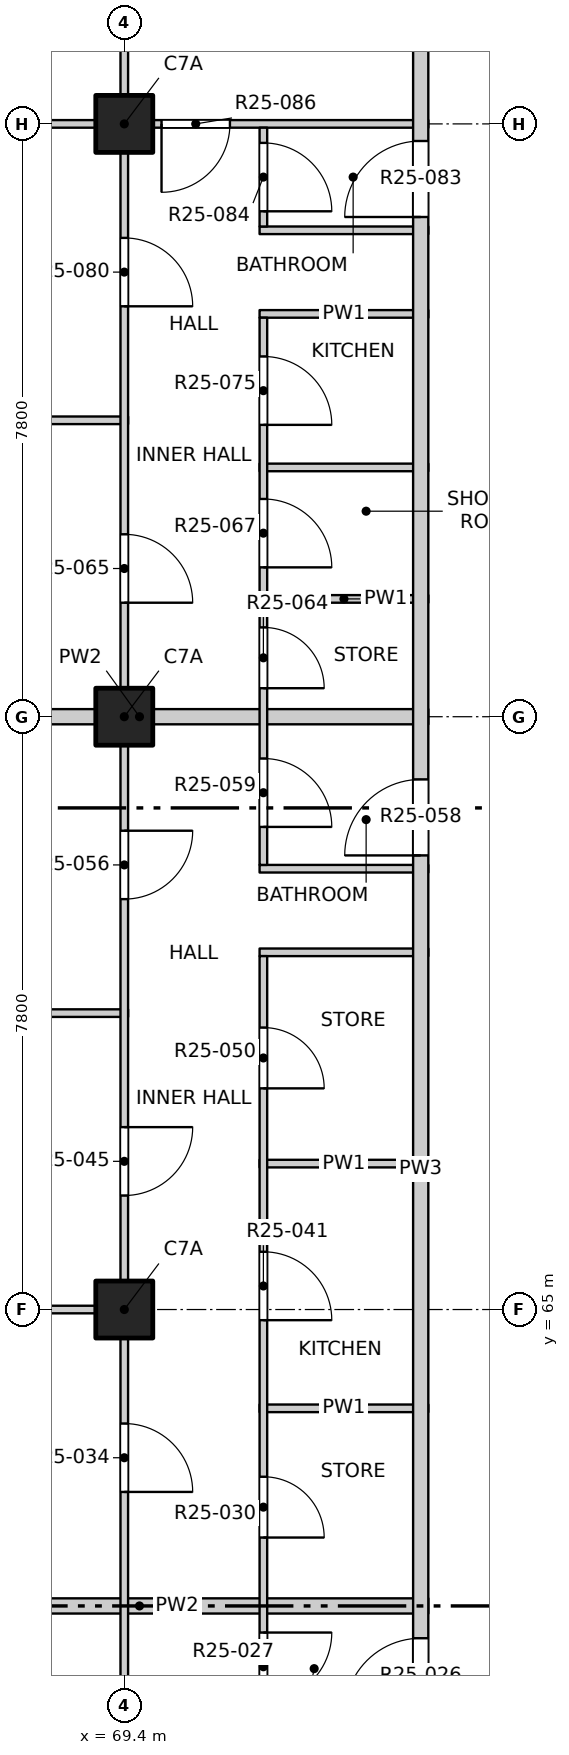
"""IFC4 building model, lengths in metres.
Left out: names, types, materials, properties, quantities, classifications, styles, units other than length and angle.
Written with IfcOpenShell. Run it as: python <this file> out.ifc"""

import sys

from ifc_helpers import new_model, si_unit, direction, frame, frame_2d, origin, origin_2d, place, context, subcontext, project, spatial, rectangle, extrude, element, fill, save


model = new_model("IFC4")
c1 = context("Model", 3, precision=1e-05, world=origin(), true_north=direction((0.0, 1.0)))
c2 = subcontext(c1, "Body", "Model", "MODEL_VIEW")
j1 = project(units=[si_unit("LENGTHUNIT", "METRE"), si_unit("PLANEANGLEUNIT", "RADIAN")], contexts=[c1])
p1 = place(None, origin())
s1 = spatial("IfcSite", under=j1, at=p1, CompositionType="ELEMENT")
p2 = place(p1, origin())
s2 = spatial("IfcBuilding", under=s1, at=p2, CompositionType="ELEMENT")
p3 = place(p2, frame((0.0, 0.0, 252.8)))
s3 = spatial("IfcBuildingStorey", under=s2, at=p3, CompositionType="ELEMENT", Elevation=252.8)
for number, where, z_axis, x_axis in (
    (1, (69.4, 65.0, -0.25), (0.0, 0.0, 1.0), (1.0, 0.0, 0.0)),
    (2, (69.4, 72.8, -0.25), (0.0, 0.0, 1.0), (1.0, 0.0, 0.0)),
    (3, (69.4, 80.6, -0.25), (0.0, 0.0, 1.0), (1.0, 0.0, 0.0)),
):
    element("IfcColumn", number, at=place(p3, frame(where, z_axis=z_axis, x_axis=x_axis)), inside=s3, PredefinedType="COLUMN", context=c2, shape_type="SweptSolid", body=[
        extrude(rectangle(XDim=0.75, YDim=0.75, at=origin_2d()), origin(), (0.0, 0.0, 1.0), 3.4),
    ])
p4 = place(p3, frame((65.8, 61.1, 0.0), z_axis=(0.0, 0.0, 1.0), x_axis=(1.0, 0.0, 0.0)))
e4 = element("IfcWall", 4, at=p4, inside=s3, PredefinedType="PARTITIONING", context=c2, shape_type="SweptSolid", body=[
    extrude(rectangle(XDim=7.6, YDim=0.2, at=frame_2d((3.8, 0.0))), origin(), (0.0, 0.0, 1.0), 2.55),
])
p5 = place(p3, frame((71.18, 63.7, 0.0), z_axis=(0.0, 0.0, 1.0), x_axis=(1.0, 0.0, 0.0)))
e5 = element("IfcWall", 5, at=p5, inside=s3, PredefinedType="PARTITIONING", context=c2, shape_type="SweptSolid", body=[
    extrude(rectangle(XDim=2.22, YDim=0.1, at=frame_2d((1.11, 0.0))), origin(), (0.0, 0.0, 1.0), 3.15),
])
p6 = place(p3, frame((65.8, 65.0, 0.0), z_axis=(0.0, 0.0, 1.0), x_axis=(1.0, 0.0, 0.0)))
e6 = element("IfcWall", 6, at=p6, inside=s3, PredefinedType="PARTITIONING", context=c2, shape_type="SweptSolid", body=[
    extrude(rectangle(XDim=3.65, YDim=0.1, at=frame_2d((1.825, 0.0))), origin(), (0.0, 0.0, 1.0), 3.15),
])
p7 = place(p3, frame((71.18, 66.92, 0.0), z_axis=(0.0, 0.0, 1.0), x_axis=(1.0, 0.0, 0.0)))
e7 = element("IfcWall", 7, at=p7, inside=s3, PredefinedType="PARTITIONING", context=c2, shape_type="SweptSolid", body=[
    extrude(rectangle(XDim=2.22, YDim=0.1, at=frame_2d((1.11, 0.0))), origin(), (0.0, 0.0, 1.0), 3.15),
])
p8 = place(p3, frame((65.8, 68.9, 0.0), z_axis=(0.0, 0.0, 1.0), x_axis=(1.0, 0.0, 0.0)))
e8 = element("IfcWall", 8, at=p8, inside=s3, PredefinedType="PARTITIONING", context=c2, shape_type="SweptSolid", body=[
    extrude(rectangle(XDim=3.65, YDim=0.1, at=frame_2d((1.825, 0.0))), origin(), (0.0, 0.0, 1.0), 2.55),
])
for number, where, z_axis, x_axis in (
    (9, (71.18, 69.7, 0.0), (0.0, 0.0, 1.0), (1.0, 0.0, 0.0)),
    (10, (71.18, 70.8, 0.0), (0.0, 0.0, 1.0), (1.0, 0.0, 0.0)),
):
    element("IfcWall", number, at=place(p3, frame(where, z_axis=z_axis, x_axis=x_axis)), inside=s3, PredefinedType="PARTITIONING", context=c2, shape_type="SweptSolid", body=[
        extrude(rectangle(XDim=2.22, YDim=0.1, at=frame_2d((1.11, 0.0))), origin(), (0.0, 0.0, 1.0), 3.15),
    ])
p9 = place(p3, frame((65.8, 72.8, 0.0), z_axis=(0.0, 0.0, 1.0), x_axis=(1.0, 0.0, 0.0)))
e11 = element("IfcWall", 11, at=p9, inside=s3, PredefinedType="PARTITIONING", context=c2, shape_type="SweptSolid", body=[
    extrude(rectangle(XDim=7.6, YDim=0.2, at=frame_2d((3.8, 0.0))), origin(), (0.0, 0.0, 1.0), 3.15),
])
for number, where, z_axis, x_axis in (
    (12, (71.18, 74.35, 0.0), (0.0, 0.0, 1.0), (1.0, 0.0, 0.0)),
    (13, (71.18, 76.08, 0.0), (0.0, 0.0, 1.0), (1.0, 0.0, 0.0)),
):
    element("IfcWall", number, at=place(p3, frame(where, z_axis=z_axis, x_axis=x_axis)), inside=s3, PredefinedType="PARTITIONING", context=c2, shape_type="SweptSolid", body=[
        extrude(rectangle(XDim=2.22, YDim=0.1, at=frame_2d((1.11, 0.0))), origin(), (0.0, 0.0, 1.0), 3.15),
    ])
p10 = place(p3, frame((65.8, 76.7, 0.0), z_axis=(0.0, 0.0, 1.0), x_axis=(1.0, 0.0, 0.0)))
e14 = element("IfcWall", 14, at=p10, inside=s3, PredefinedType="PARTITIONING", context=c2, shape_type="SweptSolid", body=[
    extrude(rectangle(XDim=3.65, YDim=0.1, at=frame_2d((1.825, 0.0))), origin(), (0.0, 0.0, 1.0), 2.55),
])
for number, where, z_axis, x_axis in (
    (15, (71.18, 78.1, 0.0), (0.0, 0.0, 1.0), (1.0, 0.0, 0.0)),
    (16, (71.18, 79.2, 0.0), (0.0, 0.0, 1.0), (1.0, 0.0, 0.0)),
):
    element("IfcWall", number, at=place(p3, frame(where, z_axis=z_axis, x_axis=x_axis)), inside=s3, PredefinedType="PARTITIONING", context=c2, shape_type="SweptSolid", body=[
        extrude(rectangle(XDim=2.22, YDim=0.1, at=frame_2d((1.11, 0.0))), origin(), (0.0, 0.0, 1.0), 3.15),
    ])
p11 = place(p3, frame((65.8, 80.6, 0.0), z_axis=(0.0, 0.0, 1.0), x_axis=(1.0, 0.0, 0.0)))
e17 = element("IfcWall", 17, at=p11, inside=s3, PredefinedType="PARTITIONING", context=c2, shape_type="SweptSolid", body=[
    extrude(rectangle(XDim=7.6, YDim=0.1, at=frame_2d((3.8, 0.0))), origin(), (0.0, 0.0, 1.0), 3.15),
])
p12 = place(p11, frame((4.09, 0.0, 0.0)))
e18 = element("IfcOpeningElement", 18, at=p12, cuts=e17, PredefinedType="OPENING", context=c2, shape_type="SweptSolid", body=[
    extrude(rectangle(XDim=0.9, YDim=2.1, at=frame_2d((0.45, 1.05))), frame((0.0, 0.06, 0.0), z_axis=(0.0, -1.0, 0.0), x_axis=(1.0, 0.0, 0.0)), (0.0, 0.0, 1.0), 0.12),
])
p13 = place(p3, frame((69.4, 45.8, 0.0), z_axis=(0.0, 0.0, 1.0), x_axis=(0.0, 1.0, 0.0)))
e19 = element("IfcWall", 19, at=p13, inside=s3, PredefinedType="PARTITIONING", context=c2, shape_type="SweptSolid", body=[
    extrude(rectangle(XDim=38.4, YDim=0.1, at=frame_2d((19.2, 0.0))), origin(), (0.0, 0.0, 1.0), 3.15),
])
p14 = place(p13, frame((1.05, 0.0, 0.0)))
e20 = element("IfcOpeningElement", 20, at=p14, cuts=e19, PredefinedType="OPENING", context=c2, shape_type="SweptSolid", body=[
    extrude(rectangle(XDim=1.2, YDim=2.1, at=frame_2d((0.6, 1.05))), frame((0.0, 0.06, 0.0), z_axis=(0.0, -1.0, 0.0), x_axis=(1.0, 0.0, 0.0)), (0.0, 0.0, 1.0), 0.12),
])
p15 = place(p13, frame((5.1, 0.0, 0.0)))
e21 = element("IfcOpeningElement", 21, at=p15, cuts=e19, PredefinedType="OPENING", context=c2, shape_type="SweptSolid", body=[
    extrude(rectangle(XDim=0.9, YDim=2.1, at=frame_2d((0.45, 1.05))), frame((0.0, 0.06, 0.0), z_axis=(0.0, -1.0, 0.0), x_axis=(1.0, 0.0, 0.0)), (0.0, 0.0, 1.0), 0.12),
])
p16 = place(p13, frame((9.0, 0.0, 0.0)))
e22 = element("IfcOpeningElement", 22, at=p16, cuts=e19, PredefinedType="OPENING", context=c2, shape_type="SweptSolid", body=[
    extrude(rectangle(XDim=0.9, YDim=2.1, at=frame_2d((0.45, 1.05))), frame((0.0, 0.06, 0.0), z_axis=(0.0, -1.0, 0.0), x_axis=(1.0, 0.0, 0.0)), (0.0, 0.0, 1.0), 0.12),
])
p17 = place(p13, frame((12.9, 0.0, 0.0)))
e23 = element("IfcOpeningElement", 23, at=p17, cuts=e19, PredefinedType="OPENING", context=c2, shape_type="SweptSolid", body=[
    extrude(rectangle(XDim=0.9, YDim=2.1, at=frame_2d((0.45, 1.05))), frame((0.0, 0.06, 0.0), z_axis=(0.0, -1.0, 0.0), x_axis=(1.0, 0.0, 0.0)), (0.0, 0.0, 1.0), 0.12),
])
p18 = place(p13, frame((16.8, 0.0, 0.0)))
e24 = element("IfcOpeningElement", 24, at=p18, cuts=e19, PredefinedType="OPENING", context=c2, shape_type="SweptSolid", body=[
    extrude(rectangle(XDim=0.9, YDim=2.1, at=frame_2d((0.45, 1.05))), frame((0.0, 0.06, 0.0), z_axis=(0.0, -1.0, 0.0), x_axis=(1.0, 0.0, 0.0)), (0.0, 0.0, 1.0), 0.12),
])
p19 = place(p13, frame((20.7, 0.0, 0.0)))
e25 = element("IfcOpeningElement", 25, at=p19, cuts=e19, PredefinedType="OPENING", context=c2, shape_type="SweptSolid", body=[
    extrude(rectangle(XDim=0.9, YDim=2.1, at=frame_2d((0.45, 1.05))), frame((0.0, 0.06, 0.0), z_axis=(0.0, -1.0, 0.0), x_axis=(1.0, 0.0, 0.0)), (0.0, 0.0, 1.0), 0.12),
])
p20 = place(p13, frame((24.6, 0.0, 0.0)))
e26 = element("IfcOpeningElement", 26, at=p20, cuts=e19, PredefinedType="OPENING", context=c2, shape_type="SweptSolid", body=[
    extrude(rectangle(XDim=0.9, YDim=2.1, at=frame_2d((0.45, 1.05))), frame((0.0, 0.06, 0.0), z_axis=(0.0, -1.0, 0.0), x_axis=(1.0, 0.0, 0.0)), (0.0, 0.0, 1.0), 0.12),
])
p21 = place(p13, frame((28.5, 0.0, 0.0)))
e27 = element("IfcOpeningElement", 27, at=p21, cuts=e19, PredefinedType="OPENING", context=c2, shape_type="SweptSolid", body=[
    extrude(rectangle(XDim=0.9, YDim=2.1, at=frame_2d((0.45, 1.05))), frame((0.0, 0.06, 0.0), z_axis=(0.0, -1.0, 0.0), x_axis=(1.0, 0.0, 0.0)), (0.0, 0.0, 1.0), 0.12),
])
p22 = place(p13, frame((32.4, 0.0, 0.0)))
e28 = element("IfcOpeningElement", 28, at=p22, cuts=e19, PredefinedType="OPENING", context=c2, shape_type="SweptSolid", body=[
    extrude(rectangle(XDim=0.9, YDim=2.1, at=frame_2d((0.45, 1.05))), frame((0.0, 0.06, 0.0), z_axis=(0.0, -1.0, 0.0), x_axis=(1.0, 0.0, 0.0)), (0.0, 0.0, 1.0), 0.12),
])
p23 = place(p13, frame((36.15, 0.0, 0.0)))
e29 = element("IfcOpeningElement", 29, at=p23, cuts=e19, PredefinedType="OPENING", context=c2, shape_type="SweptSolid", body=[
    extrude(rectangle(XDim=1.2, YDim=2.1, at=frame_2d((0.6, 1.05))), frame((0.0, 0.06, 0.0), z_axis=(0.0, -1.0, 0.0), x_axis=(1.0, 0.0, 0.0)), (0.0, 0.0, 1.0), 0.12),
])
p24 = place(p3, frame((71.23, 59.55, 0.0), z_axis=(0.0, 0.0, 1.0), x_axis=(0.0, 1.0, 0.0)))
e30 = element("IfcWall", 30, at=p24, inside=s3, PredefinedType="PARTITIONING", context=c2, shape_type="SweptSolid", body=[
    extrude(rectangle(XDim=10.1, YDim=0.1, at=frame_2d((5.05, 0.0))), origin(), (0.0, 0.0, 1.0), 3.15),
])
p25 = place(p24, frame((0.3, 0.0, 0.0)))
e31 = element("IfcOpeningElement", 31, at=p25, cuts=e30, PredefinedType="OPENING", context=c2, shape_type="SweptSolid", body=[
    extrude(rectangle(XDim=0.9, YDim=2.1, at=frame_2d((0.45, 1.05))), frame((0.0, 0.06, 0.0), z_axis=(0.0, -1.0, 0.0), x_axis=(1.0, 0.0, 0.0)), (0.0, 0.0, 1.0), 0.12),
])
p26 = place(p24, frame((2.45, 0.0, 0.0)))
e32 = element("IfcOpeningElement", 32, at=p26, cuts=e30, PredefinedType="OPENING", context=c2, shape_type="SweptSolid", body=[
    extrude(rectangle(XDim=0.8, YDim=2.1, at=frame_2d((0.4, 1.05))), frame((0.0, 0.06, 0.0), z_axis=(0.0, -1.0, 0.0), x_axis=(1.0, 0.0, 0.0)), (0.0, 0.0, 1.0), 0.12),
])
p27 = place(p24, frame((5.31, 0.0, 0.0)))
e33 = element("IfcOpeningElement", 33, at=p27, cuts=e30, PredefinedType="OPENING", context=c2, shape_type="SweptSolid", body=[
    extrude(rectangle(XDim=0.9, YDim=2.1, at=frame_2d((0.45, 1.05))), frame((0.0, 0.06, 0.0), z_axis=(0.0, -1.0, 0.0), x_axis=(1.0, 0.0, 0.0)), (0.0, 0.0, 1.0), 0.12),
])
p28 = place(p24, frame((8.36, 0.0, 0.0)))
e34 = element("IfcOpeningElement", 34, at=p28, cuts=e30, PredefinedType="OPENING", context=c2, shape_type="SweptSolid", body=[
    extrude(rectangle(XDim=0.8, YDim=2.1, at=frame_2d((0.4, 1.05))), frame((0.0, 0.06, 0.0), z_axis=(0.0, -1.0, 0.0), x_axis=(1.0, 0.0, 0.0)), (0.0, 0.0, 1.0), 0.12),
])
p29 = place(p3, frame((71.23, 70.85, 0.0), z_axis=(0.0, 0.0, 1.0), x_axis=(0.0, 1.0, 0.0)))
e35 = element("IfcWall", 35, at=p29, inside=s3, PredefinedType="PARTITIONING", context=c2, shape_type="SweptSolid", body=[
    extrude(rectangle(XDim=7.2, YDim=0.1, at=frame_2d((3.6, 0.0))), origin(), (0.0, 0.0, 1.0), 3.15),
])
p30 = place(p29, frame((0.5, 0.0, 0.0)))
e36 = element("IfcOpeningElement", 36, at=p30, cuts=e35, PredefinedType="OPENING", context=c2, shape_type="SweptSolid", body=[
    extrude(rectangle(XDim=0.9, YDim=2.1, at=frame_2d((0.45, 1.05))), frame((0.0, 0.06, 0.0), z_axis=(0.0, -1.0, 0.0), x_axis=(1.0, 0.0, 0.0)), (0.0, 0.0, 1.0), 0.12),
])
p31 = place(p29, frame((2.325, 0.0, 0.0)))
e37 = element("IfcOpeningElement", 37, at=p31, cuts=e35, PredefinedType="OPENING", context=c2, shape_type="SweptSolid", body=[
    extrude(rectangle(XDim=0.8, YDim=2.1, at=frame_2d((0.4, 1.05))), frame((0.0, 0.06, 0.0), z_axis=(0.0, -1.0, 0.0), x_axis=(1.0, 0.0, 0.0)), (0.0, 0.0, 1.0), 0.12),
])
p32 = place(p29, frame((3.915, 0.0, 0.0)))
e38 = element("IfcOpeningElement", 38, at=p32, cuts=e35, PredefinedType="OPENING", context=c2, shape_type="SweptSolid", body=[
    extrude(rectangle(XDim=0.9, YDim=2.1, at=frame_2d((0.45, 1.05))), frame((0.0, 0.06, 0.0), z_axis=(0.0, -1.0, 0.0), x_axis=(1.0, 0.0, 0.0)), (0.0, 0.0, 1.0), 0.12),
])
p33 = place(p29, frame((5.79, 0.0, 0.0)))
e39 = element("IfcOpeningElement", 39, at=p33, cuts=e35, PredefinedType="OPENING", context=c2, shape_type="SweptSolid", body=[
    extrude(rectangle(XDim=0.9, YDim=2.1, at=frame_2d((0.45, 1.05))), frame((0.0, 0.06, 0.0), z_axis=(0.0, -1.0, 0.0), x_axis=(1.0, 0.0, 0.0)), (0.0, 0.0, 1.0), 0.12),
])
p34 = place(p3, frame((71.23, 79.25, 0.0), z_axis=(0.0, 0.0, 1.0), x_axis=(0.0, 1.0, 0.0)))
e40 = element("IfcWall", 40, at=p34, inside=s3, PredefinedType="PARTITIONING", context=c2, shape_type="SweptSolid", body=[
    extrude(rectangle(XDim=1.3, YDim=0.1, at=frame_2d((0.65, 0.0))), origin(), (0.0, 0.0, 1.0), 3.15),
])
p35 = place(p34, frame((0.2, 0.0, 0.0)))
e41 = element("IfcOpeningElement", 41, at=p35, cuts=e40, PredefinedType="OPENING", context=c2, shape_type="SweptSolid", body=[
    extrude(rectangle(XDim=0.9, YDim=2.1, at=frame_2d((0.45, 1.05))), frame((0.0, 0.06, 0.0), z_axis=(0.0, -1.0, 0.0), x_axis=(1.0, 0.0, 0.0)), (0.0, 0.0, 1.0), 0.12),
])
p36 = place(p3, frame((73.3, 49.5, 0.0), z_axis=(0.0, 0.0, 1.0), x_axis=(0.0, 1.0, 0.0)))
e42 = element("IfcWall", 42, at=p36, inside=s3, PredefinedType="PARTITIONING", context=c2, shape_type="SweptSolid", body=[
    extrude(rectangle(XDim=34.7, YDim=0.2, at=frame_2d((17.35, 0.0))), origin(), (0.0, 0.0, 1.0), 3.15),
])
p37 = place(p36, frame((10.175, 0.0, 0.0)))
e43 = element("IfcOpeningElement", 43, at=p37, cuts=e42, PredefinedType="OPENING", context=c2, shape_type="SweptSolid", body=[
    extrude(rectangle(XDim=1.0, YDim=2.1, at=frame_2d((0.5, 1.05))), frame((0.0, 0.11, 0.0), z_axis=(0.0, -1.0, 0.0), x_axis=(1.0, 0.0, 0.0)), (0.0, 0.0, 1.0), 0.22),
])
p38 = place(p36, frame((21.475, 0.0, 0.0)))
e44 = element("IfcOpeningElement", 44, at=p38, cuts=e42, PredefinedType="OPENING", context=c2, shape_type="SweptSolid", body=[
    extrude(rectangle(XDim=1.0, YDim=2.1, at=frame_2d((0.5, 1.05))), frame((0.0, 0.11, 0.0), z_axis=(0.0, -1.0, 0.0), x_axis=(1.0, 0.0, 0.0)), (0.0, 0.0, 1.0), 0.22),
])
p39 = place(p36, frame((29.875, 0.0, 0.0)))
e45 = element("IfcOpeningElement", 45, at=p39, cuts=e42, PredefinedType="OPENING", context=c2, shape_type="SweptSolid", body=[
    extrude(rectangle(XDim=1.0, YDim=2.1, at=frame_2d((0.5, 1.05))), frame((0.0, 0.11, 0.0), z_axis=(0.0, -1.0, 0.0), x_axis=(1.0, 0.0, 0.0)), (0.0, 0.0, 1.0), 0.22),
])
p40 = place(p37, origin())
e46 = element("IfcDoor", 46, at=p40, inside=s3, OperationType="SINGLE_SWING_RIGHT", PredefinedType="DOOR", context=c2, shape_type="SweptSolid", body=[
    extrude(rectangle(XDim=1.0, YDim=2.1, at=frame_2d((0.5, 1.05))), frame((0.0, 0.025, 0.0), z_axis=(0.0, -1.0, 0.0), x_axis=(1.0, 0.0, 0.0)), (0.0, 0.0, 1.0), 0.05),
])
fill(e43, e46)
p41 = place(p25, origin())
e47 = element("IfcDoor", 47, at=p41, inside=s3, OperationType="SINGLE_SWING_LEFT", PredefinedType="DOOR", context=c2, shape_type="SweptSolid", body=[
    extrude(rectangle(XDim=0.9, YDim=2.1, at=frame_2d((0.45, 1.05))), frame((0.0, 0.025, 0.0), z_axis=(0.0, -1.0, 0.0), x_axis=(1.0, 0.0, 0.0)), (0.0, 0.0, 1.0), 0.05),
])
fill(e31, e47)
p42 = place(p26, origin())
e48 = element("IfcDoor", 48, at=p42, inside=s3, OperationType="SINGLE_SWING_RIGHT", PredefinedType="DOOR", context=c2, shape_type="SweptSolid", body=[
    extrude(rectangle(XDim=0.8, YDim=2.1, at=frame_2d((0.4, 1.05))), frame((0.0, 0.025, 0.0), z_axis=(0.0, -1.0, 0.0), x_axis=(1.0, 0.0, 0.0)), (0.0, 0.0, 1.0), 0.05),
])
fill(e32, e48)
p43 = place(p18, origin())
e49 = element("IfcDoor", 49, at=p43, inside=s3, OperationType="SINGLE_SWING_RIGHT", PredefinedType="DOOR", context=c2, shape_type="SweptSolid", body=[
    extrude(rectangle(XDim=0.9, YDim=2.1, at=frame_2d((0.45, 1.05))), frame((0.0, 0.025, 0.0), z_axis=(0.0, -1.0, 0.0), x_axis=(1.0, 0.0, 0.0)), (0.0, 0.0, 1.0), 0.05),
])
fill(e24, e49)
p44 = place(p27, origin())
e50 = element("IfcDoor", 50, at=p44, inside=s3, OperationType="SINGLE_SWING_RIGHT", PredefinedType="DOOR", context=c2, shape_type="SweptSolid", body=[
    extrude(rectangle(XDim=0.9, YDim=2.1, at=frame_2d((0.45, 1.05))), frame((0.0, 0.025, 0.0), z_axis=(0.0, -1.0, 0.0), x_axis=(1.0, 0.0, 0.0)), (0.0, 0.0, 1.0), 0.05),
])
fill(e33, e50)
p45 = place(p19, origin())
e51 = element("IfcDoor", 51, at=p45, inside=s3, OperationType="SINGLE_SWING_LEFT", PredefinedType="DOOR", context=c2, shape_type="SweptSolid", body=[
    extrude(rectangle(XDim=0.9, YDim=2.1, at=frame_2d((0.45, 1.05))), frame((0.0, 0.025, 0.0), z_axis=(0.0, -1.0, 0.0), x_axis=(1.0, 0.0, 0.0)), (0.0, 0.0, 1.0), 0.05),
])
fill(e25, e51)
p46 = place(p28, origin())
e52 = element("IfcDoor", 52, at=p46, inside=s3, OperationType="SINGLE_SWING_RIGHT", PredefinedType="DOOR", context=c2, shape_type="SweptSolid", body=[
    extrude(rectangle(XDim=0.8, YDim=2.1, at=frame_2d((0.4, 1.05))), frame((0.0, 0.025, 0.0), z_axis=(0.0, -1.0, 0.0), x_axis=(1.0, 0.0, 0.0)), (0.0, 0.0, 1.0), 0.05),
])
fill(e34, e52)
p47 = place(p20, origin())
e53 = element("IfcDoor", 53, at=p47, inside=s3, OperationType="SINGLE_SWING_LEFT", PredefinedType="DOOR", context=c2, shape_type="SweptSolid", body=[
    extrude(rectangle(XDim=0.9, YDim=2.1, at=frame_2d((0.45, 1.05))), frame((0.0, 0.025, 0.0), z_axis=(0.0, -1.0, 0.0), x_axis=(1.0, 0.0, 0.0)), (0.0, 0.0, 1.0), 0.05),
])
fill(e26, e53)
p48 = place(p38, origin())
e54 = element("IfcDoor", 54, at=p48, inside=s3, OperationType="SINGLE_SWING_RIGHT", PredefinedType="DOOR", context=c2, shape_type="SweptSolid", body=[
    extrude(rectangle(XDim=1.0, YDim=2.1, at=frame_2d((0.5, 1.05))), frame((0.0, 0.025, 0.0), z_axis=(0.0, -1.0, 0.0), x_axis=(1.0, 0.0, 0.0)), (0.0, 0.0, 1.0), 0.05),
])
fill(e44, e54)
p49 = place(p30, origin())
e55 = element("IfcDoor", 55, at=p49, inside=s3, OperationType="SINGLE_SWING_RIGHT", PredefinedType="DOOR", context=c2, shape_type="SweptSolid", body=[
    extrude(rectangle(XDim=0.9, YDim=2.1, at=frame_2d((0.45, 1.05))), frame((0.0, 0.025, 0.0), z_axis=(0.0, -1.0, 0.0), x_axis=(1.0, 0.0, 0.0)), (0.0, 0.0, 1.0), 0.05),
])
fill(e36, e55)
p50 = place(p31, origin())
e56 = element("IfcDoor", 56, at=p50, inside=s3, OperationType="SINGLE_SWING_RIGHT", PredefinedType="DOOR", context=c2, shape_type="SweptSolid", body=[
    extrude(rectangle(XDim=0.8, YDim=2.1, at=frame_2d((0.4, 1.05))), frame((0.0, 0.025, 0.0), z_axis=(0.0, -1.0, 0.0), x_axis=(1.0, 0.0, 0.0)), (0.0, 0.0, 1.0), 0.05),
])
fill(e37, e56)
p51 = place(p21, origin())
e57 = element("IfcDoor", 57, at=p51, inside=s3, OperationType="SINGLE_SWING_RIGHT", PredefinedType="DOOR", context=c2, shape_type="SweptSolid", body=[
    extrude(rectangle(XDim=0.9, YDim=2.1, at=frame_2d((0.45, 1.05))), frame((0.0, 0.025, 0.0), z_axis=(0.0, -1.0, 0.0), x_axis=(1.0, 0.0, 0.0)), (0.0, 0.0, 1.0), 0.05),
])
fill(e27, e57)
p52 = place(p32, origin())
e58 = element("IfcDoor", 58, at=p52, inside=s3, OperationType="SINGLE_SWING_RIGHT", PredefinedType="DOOR", context=c2, shape_type="SweptSolid", body=[
    extrude(rectangle(XDim=0.9, YDim=2.1, at=frame_2d((0.45, 1.05))), frame((0.0, 0.025, 0.0), z_axis=(0.0, -1.0, 0.0), x_axis=(1.0, 0.0, 0.0)), (0.0, 0.0, 1.0), 0.05),
])
fill(e38, e58)
p53 = place(p33, origin())
e59 = element("IfcDoor", 59, at=p53, inside=s3, OperationType="SINGLE_SWING_RIGHT", PredefinedType="DOOR", context=c2, shape_type="SweptSolid", body=[
    extrude(rectangle(XDim=0.9, YDim=2.1, at=frame_2d((0.45, 1.05))), frame((0.0, 0.025, 0.0), z_axis=(0.0, -1.0, 0.0), x_axis=(1.0, 0.0, 0.0)), (0.0, 0.0, 1.0), 0.05),
])
fill(e39, e59)
p54 = place(p22, origin())
e60 = element("IfcDoor", 60, at=p54, inside=s3, OperationType="SINGLE_SWING_RIGHT", PredefinedType="DOOR", context=c2, shape_type="SweptSolid", body=[
    extrude(rectangle(XDim=0.9, YDim=2.1, at=frame_2d((0.45, 1.05))), frame((0.0, 0.025, 0.0), z_axis=(0.0, -1.0, 0.0), x_axis=(1.0, 0.0, 0.0)), (0.0, 0.0, 1.0), 0.05),
])
fill(e28, e60)
p55 = place(p39, origin())
e61 = element("IfcDoor", 61, at=p55, inside=s3, OperationType="SINGLE_SWING_RIGHT", PredefinedType="DOOR", context=c2, shape_type="SweptSolid", body=[
    extrude(rectangle(XDim=1.0, YDim=2.1, at=frame_2d((0.5, 1.05))), frame((0.0, 0.025, 0.0), z_axis=(0.0, -1.0, 0.0), x_axis=(1.0, 0.0, 0.0)), (0.0, 0.0, 1.0), 0.05),
])
fill(e45, e61)
p56 = place(p35, origin())
e62 = element("IfcDoor", 62, at=p56, inside=s3, OperationType="SINGLE_SWING_RIGHT", PredefinedType="DOOR", context=c2, shape_type="SweptSolid", body=[
    extrude(rectangle(XDim=0.9, YDim=2.1, at=frame_2d((0.45, 1.05))), frame((0.0, 0.025, 0.0), z_axis=(0.0, -1.0, 0.0), x_axis=(1.0, 0.0, 0.0)), (0.0, 0.0, 1.0), 0.05),
])
fill(e41, e62)
p57 = place(p12, origin())
e63 = element("IfcDoor", 63, at=p57, inside=s3, OperationType="SINGLE_SWING_RIGHT", PredefinedType="DOOR", context=c2, shape_type="SweptSolid", body=[
    extrude(rectangle(XDim=0.9, YDim=2.1, at=frame_2d((0.45, 1.05))), frame((0.0, 0.025, 0.0), z_axis=(0.0, -1.0, 0.0), x_axis=(1.0, 0.0, 0.0)), (0.0, 0.0, 1.0), 0.05),
])
fill(e18, e63)
save(model, sys.argv[1])
